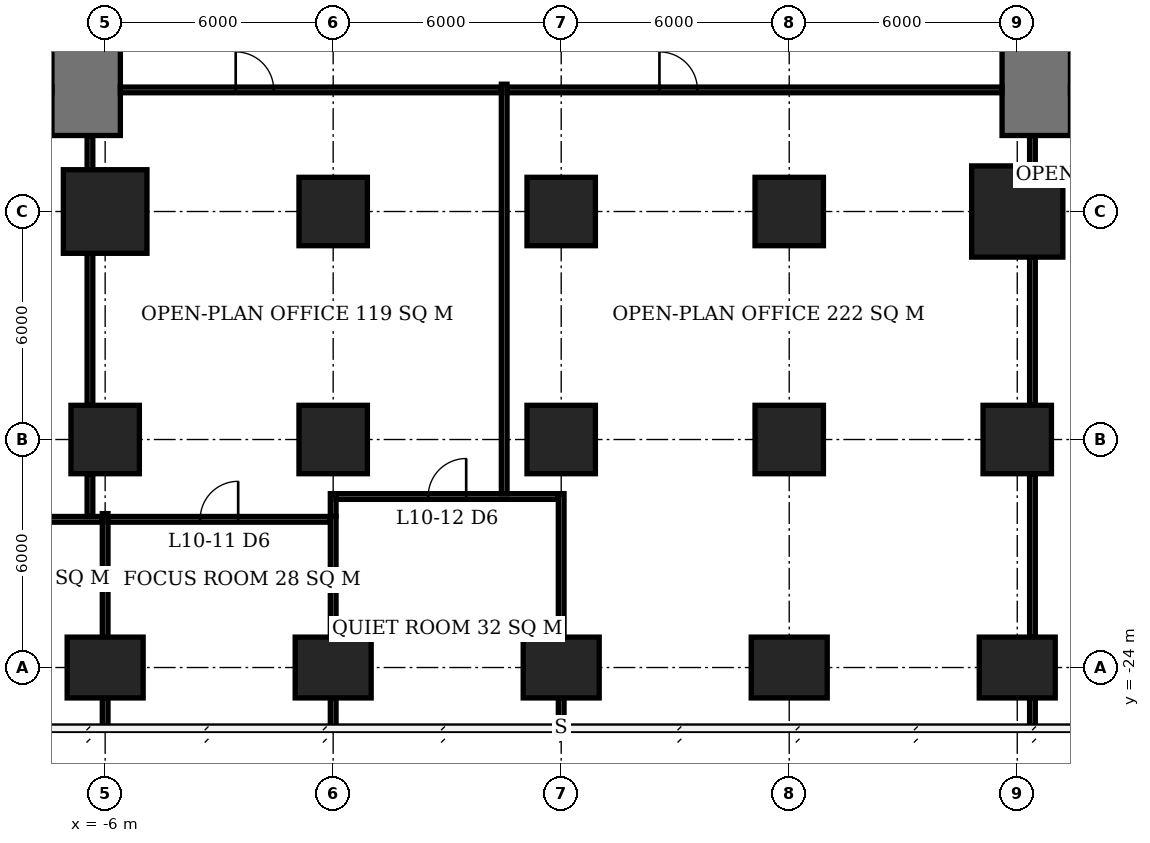
"""IFC4 building model, lengths in metres.
Left out: names, types, materials, properties, quantities, classifications, styles, units other than length and angle.
Written with IfcOpenShell. Run it as: python <this file> out.ifc"""

import sys

from ifc_helpers import new_model, si_unit, direction, frame, frame_2d, origin, origin_2d, place, context, subcontext, project, spatial, rectangle, extrude, element, fill, save


model = new_model("IFC4")
c1 = context("Model", 3, precision=1e-05, world=origin(), true_north=direction((0.0, 1.0)))
c2 = subcontext(c1, "Body", "Model", "MODEL_VIEW")
j1 = project(units=[si_unit("LENGTHUNIT", "METRE"), si_unit("PLANEANGLEUNIT", "RADIAN")], contexts=[c1])
p1 = place(None, origin())
s1 = spatial("IfcSite", under=j1, at=p1, CompositionType="ELEMENT")
p2 = place(p1, origin())
s2 = spatial("IfcBuilding", under=s1, at=p2, CompositionType="ELEMENT")
p3 = place(p2, frame((0.0, 0.0, 45.5)))
s3 = spatial("IfcBuildingStorey", under=s2, at=p3, CompositionType="ELEMENT", Elevation=45.5)
p4 = place(p3, frame((-6.0, -24.0, 0.0), z_axis=(0.0, 0.0, 1.0), x_axis=(1.0, 0.0, 0.0)))
e1 = element("IfcColumn", 1, at=p4, inside=s3, PredefinedType="COLUMN", context=c2, shape_type="SweptSolid", body=[
    extrude(rectangle(XDim=2.0, YDim=1.6, at=origin_2d()), origin(), (0.0, 0.0, 1.0), 3.9),
])
p5 = place(p3, frame((-6.0, -18.0, 0.0), z_axis=(0.0, 0.0, 1.0), x_axis=(1.0, 0.0, 0.0)))
e2 = element("IfcColumn", 2, at=p5, inside=s3, PredefinedType="COLUMN", context=c2, shape_type="SweptSolid", body=[
    extrude(rectangle(XDim=1.8, YDim=1.8, at=origin_2d()), origin(), (0.0, 0.0, 1.0), 3.9),
])
p6 = place(p3, frame((-6.0, -12.0, 0.0), z_axis=(0.0, 0.0, 1.0), x_axis=(1.0, 0.0, 0.0)))
e3 = element("IfcColumn", 3, at=p6, inside=s3, PredefinedType="COLUMN", context=c2, shape_type="SweptSolid", body=[
    extrude(rectangle(XDim=2.2, YDim=2.2, at=origin_2d()), origin(), (0.0, 0.0, 1.0), 3.9),
])
p7 = place(p3, frame((0.0, -24.0, 0.0), z_axis=(0.0, 0.0, 1.0), x_axis=(1.0, 0.0, 0.0)))
e4 = element("IfcColumn", 4, at=p7, inside=s3, PredefinedType="COLUMN", context=c2, shape_type="SweptSolid", body=[
    extrude(rectangle(XDim=2.0, YDim=1.6, at=origin_2d()), origin(), (0.0, 0.0, 1.0), 3.9),
])
for number, where, z_axis, x_axis in (
    (5, (0.0, -18.0, 0.0), (0.0, 0.0, 1.0), (1.0, 0.0, 0.0)),
    (6, (0.0, -12.0, 0.0), (0.0, 0.0, 1.0), (1.0, 0.0, 0.0)),
):
    element("IfcColumn", number, at=place(p3, frame(where, z_axis=z_axis, x_axis=x_axis)), inside=s3, PredefinedType="COLUMN", context=c2, shape_type="SweptSolid", body=[
        extrude(rectangle(XDim=1.8, YDim=1.8, at=origin_2d()), origin(), (0.0, 0.0, 1.0), 3.9),
    ])
p8 = place(p3, frame((6.0, -24.0, 0.0), z_axis=(0.0, 0.0, 1.0), x_axis=(1.0, 0.0, 0.0)))
e7 = element("IfcColumn", 7, at=p8, inside=s3, PredefinedType="COLUMN", context=c2, shape_type="SweptSolid", body=[
    extrude(rectangle(XDim=2.0, YDim=1.6, at=origin_2d()), origin(), (0.0, 0.0, 1.0), 3.9),
])
for number, where, z_axis, x_axis in (
    (8, (6.0, -18.0, 0.0), (0.0, 0.0, 1.0), (1.0, 0.0, 0.0)),
    (9, (6.0, -12.0, 0.0), (0.0, 0.0, 1.0), (1.0, 0.0, 0.0)),
):
    element("IfcColumn", number, at=place(p3, frame(where, z_axis=z_axis, x_axis=x_axis)), inside=s3, PredefinedType="COLUMN", context=c2, shape_type="SweptSolid", body=[
        extrude(rectangle(XDim=1.8, YDim=1.8, at=origin_2d()), origin(), (0.0, 0.0, 1.0), 3.9),
    ])
p9 = place(p3, frame((12.0, -24.0, 0.0), z_axis=(0.0, 0.0, 1.0), x_axis=(1.0, 0.0, 0.0)))
e10 = element("IfcColumn", 10, at=p9, inside=s3, PredefinedType="COLUMN", context=c2, shape_type="SweptSolid", body=[
    extrude(rectangle(XDim=2.0, YDim=1.6, at=origin_2d()), origin(), (0.0, 0.0, 1.0), 3.9),
])
for number, where, z_axis, x_axis in (
    (11, (12.0, -18.0, 0.0), (0.0, 0.0, 1.0), (1.0, 0.0, 0.0)),
    (12, (12.0, -12.0, 0.0), (0.0, 0.0, 1.0), (1.0, 0.0, 0.0)),
):
    element("IfcColumn", number, at=place(p3, frame(where, z_axis=z_axis, x_axis=x_axis)), inside=s3, PredefinedType="COLUMN", context=c2, shape_type="SweptSolid", body=[
        extrude(rectangle(XDim=1.8, YDim=1.8, at=origin_2d()), origin(), (0.0, 0.0, 1.0), 3.9),
    ])
p10 = place(p3, frame((18.0, -24.0, 0.0), z_axis=(0.0, 0.0, 1.0), x_axis=(1.0, 0.0, 0.0)))
e13 = element("IfcColumn", 13, at=p10, inside=s3, PredefinedType="COLUMN", context=c2, shape_type="SweptSolid", body=[
    extrude(rectangle(XDim=2.0, YDim=1.6, at=origin_2d()), origin(), (0.0, 0.0, 1.0), 3.9),
])
p11 = place(p3, frame((18.0, -18.0, 0.0), z_axis=(0.0, 0.0, 1.0), x_axis=(1.0, 0.0, 0.0)))
e14 = element("IfcColumn", 14, at=p11, inside=s3, PredefinedType="COLUMN", context=c2, shape_type="SweptSolid", body=[
    extrude(rectangle(XDim=1.8, YDim=1.8, at=origin_2d()), origin(), (0.0, 0.0, 1.0), 3.9),
])
p12 = place(p3, frame((18.0, -12.0, 0.0), z_axis=(0.0, 0.0, 1.0), x_axis=(1.0, 0.0, 0.0)))
e15 = element("IfcColumn", 15, at=p12, inside=s3, PredefinedType="COLUMN", context=c2, shape_type="SweptSolid", body=[
    extrude(rectangle(XDim=2.4, YDim=2.4, at=origin_2d()), origin(), (0.0, 0.0, 1.0), 3.9),
])
for number, where, z_axis, x_axis in (
    (16, (-6.5, -10.0, 0.0), (0.0, 0.0, 1.0), (0.0, 1.0, 0.0)),
    (17, (18.5, -10.0, 0.0), (0.0, 0.0, 1.0), (0.0, 1.0, 0.0)),
):
    element("IfcWall", number, at=place(p3, frame(where, z_axis=z_axis, x_axis=x_axis)), inside=s3, PredefinedType="SHEAR", context=c2, shape_type="SweptSolid", body=[
        extrude(rectangle(XDim=2.4, YDim=1.8, at=frame_2d((1.2, 0.0))), origin(), (0.0, 0.0, 1.0), 3.9),
    ])
p13 = place(p3, frame((-11.925, -20.1, 0.0), z_axis=(0.0, 0.0, 1.0), x_axis=(1.0, 0.0, 0.0)))
e18 = element("IfcWall", 18, at=p13, inside=s3, PredefinedType="PARTITIONING", context=c2, shape_type="SweptSolid", body=[
    extrude(rectangle(XDim=5.85, YDim=0.15, at=frame_2d((2.925, 0.0))), origin(), (0.0, 0.0, 1.0), 3.65),
])
p14 = place(p13, frame((2.425, 0.0, 0.0)))
e19 = element("IfcOpeningElement", 19, at=p14, cuts=e18, PredefinedType="OPENING", context=c2, shape_type="SweptSolid", body=[
    extrude(rectangle(XDim=1.0, YDim=2.1, at=frame_2d((0.5, 1.05))), frame((0.0, 0.085, 0.0), z_axis=(0.0, -1.0, 0.0), x_axis=(1.0, 0.0, 0.0)), (0.0, 0.0, 1.0), 0.17),
])
p15 = place(p3, frame((-5.925, -20.1, 0.0), z_axis=(0.0, 0.0, 1.0), x_axis=(1.0, 0.0, 0.0)))
e20 = element("IfcWall", 20, at=p15, inside=s3, PredefinedType="PARTITIONING", context=c2, shape_type="SweptSolid", body=[
    extrude(rectangle(XDim=5.85, YDim=0.15, at=frame_2d((2.925, 0.0))), origin(), (0.0, 0.0, 1.0), 3.65),
])
p16 = place(p15, frame((2.425, 0.0, 0.0)))
e21 = element("IfcOpeningElement", 21, at=p16, cuts=e20, PredefinedType="OPENING", context=c2, shape_type="SweptSolid", body=[
    extrude(rectangle(XDim=1.0, YDim=2.1, at=frame_2d((0.5, 1.05))), frame((0.0, 0.085, 0.0), z_axis=(0.0, -1.0, 0.0), x_axis=(1.0, 0.0, 0.0)), (0.0, 0.0, 1.0), 0.17),
])
p17 = place(p3, frame((0.075, -19.5, 0.0), z_axis=(0.0, 0.0, 1.0), x_axis=(1.0, 0.0, 0.0)))
e22 = element("IfcWall", 22, at=p17, inside=s3, PredefinedType="PARTITIONING", context=c2, shape_type="SweptSolid", body=[
    extrude(rectangle(XDim=5.85, YDim=0.15, at=frame_2d((2.925, 0.0))), origin(), (0.0, 0.0, 1.0), 3.65),
])
p18 = place(p17, frame((2.425, 0.0, 0.0)))
e23 = element("IfcOpeningElement", 23, at=p18, cuts=e22, PredefinedType="OPENING", context=c2, shape_type="SweptSolid", body=[
    extrude(rectangle(XDim=1.0, YDim=2.1, at=frame_2d((0.5, 1.05))), frame((0.0, 0.085, 0.0), z_axis=(0.0, -1.0, 0.0), x_axis=(1.0, 0.0, 0.0)), (0.0, 0.0, 1.0), 0.17),
])
p19 = place(p3, frame((-6.0, -25.6, 0.0), z_axis=(0.0, 0.0, 1.0), x_axis=(0.0, 1.0, 0.0)))
e24 = element("IfcWall", 24, at=p19, inside=s3, PredefinedType="PARTITIONING", context=c2, shape_type="SweptSolid", body=[
    extrude(rectangle(XDim=0.8, YDim=0.15, at=frame_2d((0.4, 0.0))), origin(), (0.0, 0.0, 1.0), 3.65),
])
p20 = place(p3, frame((-6.0, -23.2, 0.0), z_axis=(0.0, 0.0, 1.0), x_axis=(0.0, 1.0, 0.0)))
e25 = element("IfcWall", 25, at=p20, inside=s3, PredefinedType="PARTITIONING", context=c2, shape_type="SweptSolid", body=[
    extrude(rectangle(XDim=3.25, YDim=0.15, at=frame_2d((1.625, 0.0))), origin(), (0.0, 0.0, 1.0), 3.65),
])
p21 = place(p3, frame((0.0, -25.6, 0.0), z_axis=(0.0, 0.0, 1.0), x_axis=(0.0, 1.0, 0.0)))
e26 = element("IfcWall", 26, at=p21, inside=s3, PredefinedType="PARTITIONING", context=c2, shape_type="SweptSolid", body=[
    extrude(rectangle(XDim=0.8, YDim=0.15, at=frame_2d((0.4, 0.0))), origin(), (0.0, 0.0, 1.0), 3.65),
])
p22 = place(p3, frame((0.0, -23.2, 0.0), z_axis=(0.0, 0.0, 1.0), x_axis=(0.0, 1.0, 0.0)))
e27 = element("IfcWall", 27, at=p22, inside=s3, PredefinedType="PARTITIONING", context=c2, shape_type="SweptSolid", body=[
    extrude(rectangle(XDim=3.175, YDim=0.15, at=frame_2d((1.587, 0.0))), origin(), (0.0, 0.0, 1.0), 3.65),
])
p23 = place(p3, frame((0.0, -20.025, 0.0), z_axis=(0.0, 0.0, 1.0), x_axis=(0.0, 1.0, 0.0)))
e28 = element("IfcWall", 28, at=p23, inside=s3, PredefinedType="PARTITIONING", context=c2, shape_type="SweptSolid", body=[
    extrude(rectangle(XDim=0.6, YDim=0.15, at=frame_2d((0.3, 0.0))), origin(), (0.0, 0.0, 1.0), 3.65),
])
p24 = place(p3, frame((6.0, -25.55, 0.0), z_axis=(0.0, 0.0, 1.0), x_axis=(0.0, 1.0, 0.0)))
e29 = element("IfcWall", 29, at=p24, inside=s3, PredefinedType="PARTITIONING", context=c2, shape_type="SweptSolid", body=[
    extrude(rectangle(XDim=0.75, YDim=0.15, at=frame_2d((0.375, 0.0))), origin(), (0.0, 0.0, 1.0), 3.65),
])
p25 = place(p3, frame((6.0, -23.2, 0.0), z_axis=(0.0, 0.0, 1.0), x_axis=(0.0, 1.0, 0.0)))
e30 = element("IfcWall", 30, at=p25, inside=s3, PredefinedType="PARTITIONING", context=c2, shape_type="SweptSolid", body=[
    extrude(rectangle(XDim=3.775, YDim=0.15, at=frame_2d((1.887, 0.0))), origin(), (0.0, 0.0, 1.0), 3.65),
])
p26 = place(p3, frame((-6.4, -20.025, 0.0), z_axis=(0.0, 0.0, 1.0), x_axis=(0.0, 1.0, 0.0)))
e31 = element("IfcWall", 31, at=p26, inside=s3, PredefinedType="PARTITIONING", context=c2, shape_type="SweptSolid", body=[
    extrude(rectangle(XDim=1.125, YDim=0.15, at=frame_2d((0.562, 0.0))), origin(), (0.0, 0.0, 1.0), 3.65),
])
p27 = place(p3, frame((-6.4, -17.1, 0.0), z_axis=(0.0, 0.0, 1.0), x_axis=(0.0, 1.0, 0.0)))
e32 = element("IfcWall", 32, at=p27, inside=s3, PredefinedType="PARTITIONING", context=c2, shape_type="SweptSolid", body=[
    extrude(rectangle(XDim=4.0, YDim=0.15, at=frame_2d((2.0, 0.0))), origin(), (0.0, 0.0, 1.0), 3.65),
])
p28 = place(p3, frame((-6.4, -10.9, 0.0), z_axis=(0.0, 0.0, 1.0), x_axis=(0.0, 1.0, 0.0)))
e33 = element("IfcWall", 33, at=p28, inside=s3, PredefinedType="PARTITIONING", context=c2, shape_type="SweptSolid", body=[
    extrude(rectangle(XDim=0.9, YDim=0.15, at=frame_2d((0.45, 0.0))), origin(), (0.0, 0.0, 1.0), 3.65),
])
p29 = place(p3, frame((-5.6, -8.8, 0.0), z_axis=(0.0, 0.0, 1.0), x_axis=(1.0, 0.0, 0.0)))
e34 = element("IfcWall", 34, at=p29, inside=s3, PredefinedType="PARTITIONING", context=c2, shape_type="SweptSolid", body=[
    extrude(rectangle(XDim=10.025, YDim=0.15, at=frame_2d((5.013, 0.0))), origin(), (0.0, 0.0, 1.0), 3.65),
])
p30 = place(p29, frame((3.035, 0.0, 0.0)))
e35 = element("IfcOpeningElement", 35, at=p30, cuts=e34, PredefinedType="OPENING", context=c2, shape_type="SweptSolid", body=[
    extrude(rectangle(XDim=1.0, YDim=2.1, at=frame_2d((0.5, 1.05))), frame((0.0, 0.085, 0.0), z_axis=(0.0, -1.0, 0.0), x_axis=(1.0, 0.0, 0.0)), (0.0, 0.0, 1.0), 0.17),
])
p31 = place(p3, frame((4.5, -19.425, 0.0), z_axis=(0.0, 0.0, 1.0), x_axis=(0.0, 1.0, 0.0)))
e36 = element("IfcWall", 36, at=p31, inside=s3, PredefinedType="PARTITIONING", context=c2, shape_type="SweptSolid", body=[
    extrude(rectangle(XDim=10.775, YDim=0.15, at=frame_2d((5.388, 0.0))), origin(), (0.0, 0.0, 1.0), 3.65),
])
p32 = place(p3, frame((4.575, -8.8, 0.0), z_axis=(0.0, 0.0, 1.0), x_axis=(1.0, 0.0, 0.0)))
e37 = element("IfcWall", 37, at=p32, inside=s3, PredefinedType="PARTITIONING", context=c2, shape_type="SweptSolid", body=[
    extrude(rectangle(XDim=13.025, YDim=0.15, at=frame_2d((6.513, 0.0))), origin(), (0.0, 0.0, 1.0), 3.65),
])
p33 = place(p32, frame((4.01, 0.0, 0.0)))
e38 = element("IfcOpeningElement", 38, at=p33, cuts=e37, PredefinedType="OPENING", context=c2, shape_type="SweptSolid", body=[
    extrude(rectangle(XDim=1.0, YDim=2.1, at=frame_2d((0.5, 1.05))), frame((0.0, 0.085, 0.0), z_axis=(0.0, -1.0, 0.0), x_axis=(1.0, 0.0, 0.0)), (0.0, 0.0, 1.0), 0.17),
])
p34 = place(p3, frame((18.4, -25.55, 0.0), z_axis=(0.0, 0.0, 1.0), x_axis=(0.0, 1.0, 0.0)))
e39 = element("IfcWall", 39, at=p34, inside=s3, PredefinedType="PARTITIONING", context=c2, shape_type="SweptSolid", body=[
    extrude(rectangle(XDim=0.75, YDim=0.15, at=frame_2d((0.375, 0.0))), origin(), (0.0, 0.0, 1.0), 3.65),
])
p35 = place(p3, frame((18.4, -23.2, 0.0), z_axis=(0.0, 0.0, 1.0), x_axis=(0.0, 1.0, 0.0)))
e40 = element("IfcWall", 40, at=p35, inside=s3, PredefinedType="PARTITIONING", context=c2, shape_type="SweptSolid", body=[
    extrude(rectangle(XDim=4.3, YDim=0.15, at=frame_2d((2.15, 0.0))), origin(), (0.0, 0.0, 1.0), 3.65),
])
p36 = place(p3, frame((18.4, -17.1, 0.0), z_axis=(0.0, 0.0, 1.0), x_axis=(0.0, 1.0, 0.0)))
e41 = element("IfcWall", 41, at=p36, inside=s3, PredefinedType="PARTITIONING", context=c2, shape_type="SweptSolid", body=[
    extrude(rectangle(XDim=3.9, YDim=0.15, at=frame_2d((1.95, 0.0))), origin(), (0.0, 0.0, 1.0), 3.65),
])
p37 = place(p3, frame((18.4, -10.8, 0.0), z_axis=(0.0, 0.0, 1.0), x_axis=(0.0, 1.0, 0.0)))
e42 = element("IfcWall", 42, at=p37, inside=s3, PredefinedType="PARTITIONING", context=c2, shape_type="SweptSolid", body=[
    extrude(rectangle(XDim=0.8, YDim=0.15, at=frame_2d((0.4, 0.0))), origin(), (0.0, 0.0, 1.0), 3.65),
])
p38 = place(p16, origin())
e43 = element("IfcDoor", 43, at=p38, inside=s3, OperationType="SINGLE_SWING_RIGHT", PredefinedType="DOOR", context=c2, shape_type="SweptSolid", body=[
    extrude(rectangle(XDim=1.0, YDim=2.1, at=frame_2d((0.5, 1.05))), frame((0.0, 0.025, 0.0), z_axis=(0.0, -1.0, 0.0), x_axis=(1.0, 0.0, 0.0)), (0.0, 0.0, 1.0), 0.05),
])
fill(e21, e43)
p39 = place(p18, origin())
e44 = element("IfcDoor", 44, at=p39, inside=s3, OperationType="SINGLE_SWING_RIGHT", PredefinedType="DOOR", context=c2, shape_type="SweptSolid", body=[
    extrude(rectangle(XDim=1.0, YDim=2.1, at=frame_2d((0.5, 1.05))), frame((0.0, 0.025, 0.0), z_axis=(0.0, -1.0, 0.0), x_axis=(1.0, 0.0, 0.0)), (0.0, 0.0, 1.0), 0.05),
])
fill(e23, e44)
p40 = place(p33, origin())
e45 = element("IfcDoor", 45, at=p40, inside=s3, OperationType="SINGLE_SWING_LEFT", PredefinedType="DOOR", context=c2, shape_type="SweptSolid", body=[
    extrude(rectangle(XDim=1.0, YDim=2.1, at=frame_2d((0.5, 1.05))), frame((0.0, 0.025, 0.0), z_axis=(0.0, -1.0, 0.0), x_axis=(1.0, 0.0, 0.0)), (0.0, 0.0, 1.0), 0.05),
])
fill(e38, e45)
p41 = place(p30, origin())
e46 = element("IfcDoor", 46, at=p41, inside=s3, OperationType="SINGLE_SWING_LEFT", PredefinedType="DOOR", context=c2, shape_type="SweptSolid", body=[
    extrude(rectangle(XDim=1.0, YDim=2.1, at=frame_2d((0.5, 1.05))), frame((0.0, 0.025, 0.0), z_axis=(0.0, -1.0, 0.0), x_axis=(1.0, 0.0, 0.0)), (0.0, 0.0, 1.0), 0.05),
])
fill(e35, e46)
save(model, sys.argv[1])
